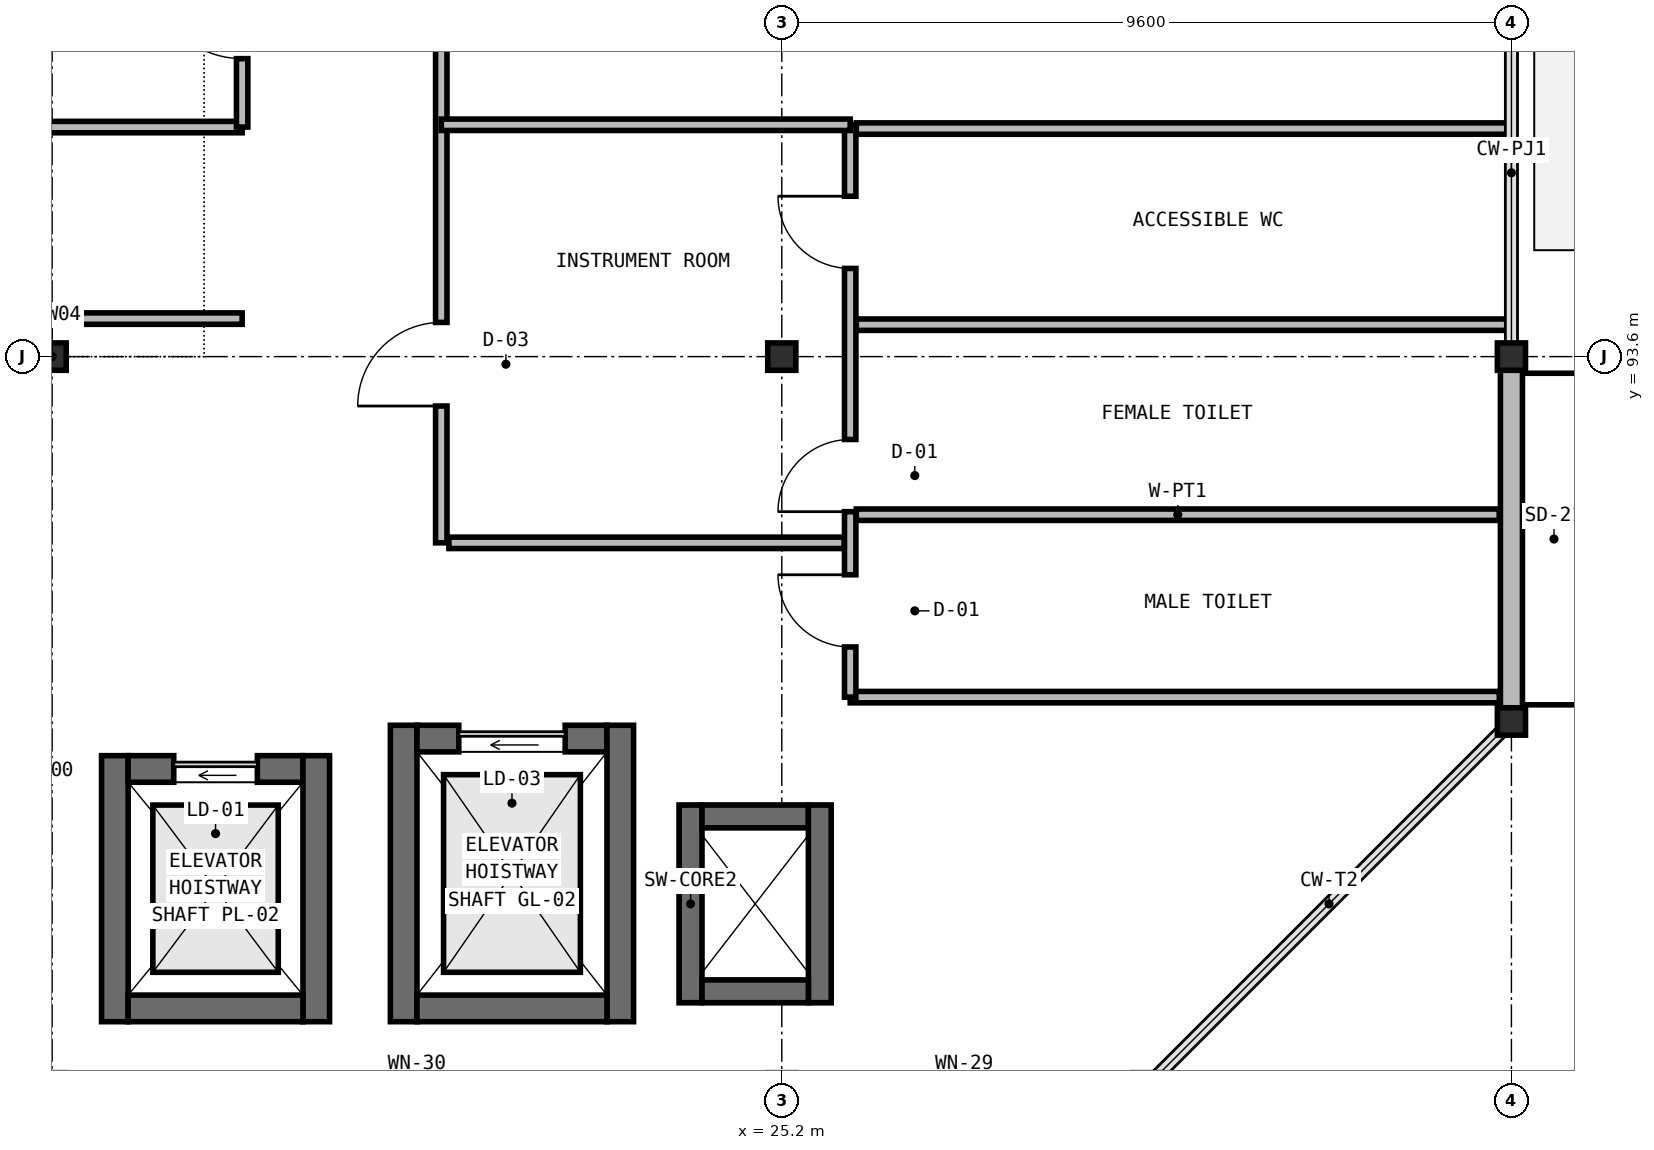
"""IFC4 building model, lengths in metres.
Left out: names, types, materials, properties, quantities, classifications, styles, units other than length and angle.
Written with IfcOpenShell. Run it as: python <this file> out.ifc"""

import sys

from ifc_helpers import new_model, si_unit, direction, frame, frame_2d, origin, origin_2d, place, context, subcontext, project, spatial, rectangle, i_section, extrude, element, fill, save


model = new_model("IFC4")
c1 = context("Model", 3, precision=1e-05, world=origin(), true_north=direction((0.0, 1.0)))
c2 = subcontext(c1, "Body", "Model", "MODEL_VIEW")
j1 = project(units=[si_unit("LENGTHUNIT", "METRE"), si_unit("PLANEANGLEUNIT", "RADIAN")], contexts=[c1])
p1 = place(None, origin())
s1 = spatial("IfcSite", under=j1, at=p1, CompositionType="ELEMENT")
p2 = place(p1, origin())
s2 = spatial("IfcBuilding", under=s1, at=p2, CompositionType="ELEMENT")
p3 = place(p2, frame((0.0, 0.0, 9.8)))
s3 = spatial("IfcBuildingStorey", under=s2, at=p3, CompositionType="ELEMENT", Elevation=9.8)
p4 = place(p3, frame((16.425, 84.85, 0.0), z_axis=(0.0, 0.0, 1.0), x_axis=(0.0, 1.0, 0.0)))
e1 = element("IfcWall", 1, at=p4, inside=s3, PredefinedType="SHEAR", context=c2, shape_type="SweptSolid", body=[
    extrude(rectangle(XDim=3.5, YDim=0.35, at=frame_2d((1.75, 0.0))), origin(), (0.0, 0.0, 1.0), 4.55),
])
p5 = place(p3, frame((16.6, 88.175, 0.0), z_axis=(0.0, 0.0, 1.0), x_axis=(1.0, 0.0, 0.0)))
e2 = element("IfcWall", 2, at=p5, inside=s3, PredefinedType="SHEAR", context=c2, shape_type="SweptSolid", body=[
    extrude(rectangle(XDim=2.3, YDim=0.35, at=frame_2d((1.15, 0.0))), origin(), (0.0, 0.0, 1.0), 4.55),
])
p6 = place(p5, frame((0.6, 0.0, 0.0)))
e3 = element("IfcOpeningElement", 3, at=p6, cuts=e2, PredefinedType="OPENING", context=c2, shape_type="SweptSolid", body=[
    extrude(rectangle(XDim=1.1, YDim=2.15, at=frame_2d((0.55, 1.075))), frame((0.0, 0.185, 0.0), z_axis=(0.0, -1.0, 0.0), x_axis=(1.0, 0.0, 0.0)), (0.0, 0.0, 1.0), 0.37),
])
p7 = place(p3, frame((19.075, 88.35, 0.0), z_axis=(0.0, 0.0, 1.0), x_axis=(0.0, -1.0, 0.0)))
e4 = element("IfcWall", 4, at=p7, inside=s3, PredefinedType="SHEAR", context=c2, shape_type="SweptSolid", body=[
    extrude(rectangle(XDim=3.5, YDim=0.35, at=frame_2d((1.75, 0.0))), origin(), (0.0, 0.0, 1.0), 4.55),
])
p8 = place(p3, frame((18.9, 85.025, 0.0), z_axis=(0.0, 0.0, 1.0), x_axis=(-1.0, 0.0, 0.0)))
e5 = element("IfcWall", 5, at=p8, inside=s3, PredefinedType="SHEAR", context=c2, shape_type="SweptSolid", body=[
    extrude(rectangle(XDim=2.3, YDim=0.35, at=frame_2d((1.15, 0.0))), origin(), (0.0, 0.0, 1.0), 4.55),
])
p9 = place(p3, frame((20.225, 84.85, 0.0), z_axis=(0.0, 0.0, 1.0), x_axis=(0.0, 1.0, 0.0)))
e6 = element("IfcWall", 6, at=p9, inside=s3, PredefinedType="SHEAR", context=c2, shape_type="SweptSolid", body=[
    extrude(rectangle(XDim=3.9, YDim=0.35, at=frame_2d((1.95, 0.0))), origin(), (0.0, 0.0, 1.0), 4.55),
])
p10 = place(p3, frame((20.4, 88.575, 0.0), z_axis=(0.0, 0.0, 1.0), x_axis=(1.0, 0.0, 0.0)))
e7 = element("IfcWall", 7, at=p10, inside=s3, PredefinedType="SHEAR", context=c2, shape_type="SweptSolid", body=[
    extrude(rectangle(XDim=2.5, YDim=0.35, at=frame_2d((1.25, 0.0))), origin(), (0.0, 0.0, 1.0), 4.55),
])
p11 = place(p10, frame((0.55, 0.0, 0.0)))
e8 = element("IfcOpeningElement", 8, at=p11, cuts=e7, PredefinedType="OPENING", context=c2, shape_type="SweptSolid", body=[
    extrude(rectangle(XDim=1.4, YDim=2.3, at=frame_2d((0.7, 1.15))), frame((0.0, 0.185, 0.0), z_axis=(0.0, -1.0, 0.0), x_axis=(1.0, 0.0, 0.0)), (0.0, 0.0, 1.0), 0.37),
])
p12 = place(p3, frame((23.075, 88.75, 0.0), z_axis=(0.0, 0.0, 1.0), x_axis=(0.0, -1.0, 0.0)))
e9 = element("IfcWall", 9, at=p12, inside=s3, PredefinedType="SHEAR", context=c2, shape_type="SweptSolid", body=[
    extrude(rectangle(XDim=3.9, YDim=0.35, at=frame_2d((1.95, 0.0))), origin(), (0.0, 0.0, 1.0), 4.55),
])
p13 = place(p3, frame((22.9, 85.025, 0.0), z_axis=(0.0, 0.0, 1.0), x_axis=(-1.0, 0.0, 0.0)))
e10 = element("IfcWall", 10, at=p13, inside=s3, PredefinedType="SHEAR", context=c2, shape_type="SweptSolid", body=[
    extrude(rectangle(XDim=2.5, YDim=0.35, at=frame_2d((1.25, 0.0))), origin(), (0.0, 0.0, 1.0), 4.55),
])
for number, where, z_axis, x_axis in (
    (11, (15.6, 93.6, 0.0), (0.0, 0.0, 1.0), (1.0, 0.0, 0.0)),
    (12, (25.2, 93.6, 0.0), (0.0, 0.0, 1.0), (1.0, 0.0, 0.0)),
    (13, (34.8, 93.6, 0.0), (0.0, 0.0, 1.0), (1.0, 0.0, 0.0)),
    (14, (34.8, 88.8, 0.0), (0.0, 0.0, 1.0), (1.0, 0.0, 0.0)),
):
    element("IfcColumn", number, at=place(p3, frame(where, z_axis=z_axis, x_axis=x_axis)), inside=s3, PredefinedType="COLUMN", context=c2, shape_type="SweptSolid", body=[
        extrude(i_section(OverallWidth=0.37, OverallDepth=0.36, WebThickness=0.014, FlangeThickness=0.022, at=origin_2d()), origin(), (0.0, 0.0, 1.0), 4.55),
    ])
p14 = place(p3, frame((24.0, 85.1, 0.0), z_axis=(0.0, 0.0, 1.0), x_axis=(0.0, 1.0, 0.0)))
e15 = element("IfcWall", 15, at=p14, inside=s3, PredefinedType="SHEAR", context=c2, shape_type="SweptSolid", body=[
    extrude(rectangle(XDim=2.6, YDim=0.3, at=frame_2d((1.3, 0.0))), origin(), (0.0, 0.0, 1.0), 4.37),
])
p15 = place(p3, frame((24.15, 87.55, 0.0), z_axis=(0.0, 0.0, 1.0), x_axis=(1.0, 0.0, 0.0)))
e16 = element("IfcWall", 16, at=p15, inside=s3, PredefinedType="SHEAR", context=c2, shape_type="SweptSolid", body=[
    extrude(rectangle(XDim=1.4, YDim=0.3, at=frame_2d((0.7, 0.0))), origin(), (0.0, 0.0, 1.0), 4.37),
])
p16 = place(p3, frame((25.7, 87.7, 0.0), z_axis=(0.0, 0.0, 1.0), x_axis=(0.0, -1.0, 0.0)))
e17 = element("IfcWall", 17, at=p16, inside=s3, PredefinedType="SHEAR", context=c2, shape_type="SweptSolid", body=[
    extrude(rectangle(XDim=2.6, YDim=0.3, at=frame_2d((1.3, 0.0))), origin(), (0.0, 0.0, 1.0), 4.37),
])
p17 = place(p3, frame((25.55, 85.25, 0.0), z_axis=(0.0, 0.0, 1.0), x_axis=(-1.0, 0.0, 0.0)))
e18 = element("IfcWall", 18, at=p17, inside=s3, PredefinedType="SHEAR", context=c2, shape_type="SweptSolid", body=[
    extrude(rectangle(XDim=1.4, YDim=0.3, at=frame_2d((0.7, 0.0))), origin(), (0.0, 0.0, 1.0), 4.37),
])
p18 = place(p3, frame((34.8, 93.596, 0.0), z_axis=(0.0, 0.0, 1.0), x_axis=(0.0, -1.0, 0.0)))
e19 = element("IfcWall", 19, at=p18, inside=s3, PredefinedType="SOLIDWALL", context=c2, shape_type="SweptSolid", body=[
    extrude(rectangle(XDim=4.792, YDim=0.29, at=frame_2d((2.396, 0.0))), origin(), (0.0, 0.0, 1.0), 4.37),
])
p19 = place(p3, frame((26.18, 91.52, 0.0), z_axis=(0.0, 0.0, 1.0), x_axis=(1.0, 0.0, 0.0)))
e20 = element("IfcWall", 20, at=p19, inside=s3, PredefinedType="PARTITIONING", context=c2, shape_type="SweptSolid", body=[
    extrude(rectangle(XDim=8.46, YDim=0.15, at=frame_2d((4.23, 0.0))), origin(), (0.0, 0.0, 1.0), 4.3),
])
for number, where, z_axis, x_axis in (
    (21, (26.18, 94.02, 0.0), (0.0, 0.0, 1.0), (1.0, 0.0, 0.0)),
    (22, (26.18, 96.6, 0.0), (0.0, 0.0, 1.0), (1.0, 0.0, 0.0)),
):
    element("IfcWall", number, at=place(p3, frame(where, z_axis=z_axis, x_axis=x_axis)), inside=s3, PredefinedType="PARTITIONING", context=c2, shape_type="SweptSolid", body=[
        extrude(rectangle(XDim=8.56, YDim=0.15, at=frame_2d((4.28, 0.0))), origin(), (0.0, 0.0, 1.0), 4.3),
    ])
p20 = place(p3, frame((26.1, 89.12, 0.0), z_axis=(0.0, 0.0, 1.0), x_axis=(1.0, 0.0, 0.0)))
e23 = element("IfcWall", 23, at=p20, inside=s3, PredefinedType="PARTITIONING", context=c2, shape_type="SweptSolid", body=[
    extrude(rectangle(XDim=8.54, YDim=0.15, at=frame_2d((4.27, 0.0))), origin(), (0.0, 0.0, 1.0), 4.3),
])
p21 = place(p3, frame((26.1, 89.12, 0.0), z_axis=(0.0, 0.0, 1.0), x_axis=(0.0, 1.0, 0.0)))
e24 = element("IfcWall", 24, at=p21, inside=s3, PredefinedType="PARTITIONING", context=c2, shape_type="SweptSolid", body=[
    extrude(rectangle(XDim=7.53, YDim=0.15, at=frame_2d((3.765, 0.0))), origin(), (0.0, 0.0, 1.0), 4.3),
])
p22 = place(p21, frame((0.66, 0.0, 0.0)))
e25 = element("IfcOpeningElement", 25, at=p22, cuts=e24, PredefinedType="OPENING", context=c2, shape_type="SweptSolid", body=[
    extrude(rectangle(XDim=0.95, YDim=2.1, at=frame_2d((0.475, 1.05))), frame((0.0, 0.085, 0.0), z_axis=(0.0, -1.0, 0.0), x_axis=(1.0, 0.0, 0.0)), (0.0, 0.0, 1.0), 0.17),
])
p23 = place(p21, frame((2.44, 0.0, 0.0)))
e26 = element("IfcOpeningElement", 26, at=p23, cuts=e24, PredefinedType="OPENING", context=c2, shape_type="SweptSolid", body=[
    extrude(rectangle(XDim=0.95, YDim=2.1, at=frame_2d((0.475, 1.05))), frame((0.0, 0.085, 0.0), z_axis=(0.0, -1.0, 0.0), x_axis=(1.0, 0.0, 0.0)), (0.0, 0.0, 1.0), 0.17),
])
p24 = place(p21, frame((5.64, 0.0, 0.0)))
e27 = element("IfcOpeningElement", 27, at=p24, cuts=e24, PredefinedType="OPENING", context=c2, shape_type="SweptSolid", body=[
    extrude(rectangle(XDim=0.95, YDim=2.1, at=frame_2d((0.475, 1.05))), frame((0.0, 0.085, 0.0), z_axis=(0.0, -1.0, 0.0), x_axis=(1.0, 0.0, 0.0)), (0.0, 0.0, 1.0), 0.17),
])
p25 = place(p3, frame((6.16, 96.62, 0.0), z_axis=(0.0, 0.0, 1.0), x_axis=(1.0, 0.0, 0.0)))
e28 = element("IfcWall", 28, at=p25, inside=s3, PredefinedType="PARTITIONING", context=c2, shape_type="SweptSolid", body=[
    extrude(rectangle(XDim=11.94, YDim=0.15, at=frame_2d((5.97, 0.0))), origin(), (0.0, 0.0, 1.0), 4.3),
])
p26 = place(p3, frame((11.02, 94.1, 0.0), z_axis=(0.0, 0.0, 1.0), x_axis=(1.0, 0.0, 0.0)))
e29 = element("IfcWall", 29, at=p26, inside=s3, PredefinedType="PARTITIONING", context=c2, shape_type="SweptSolid", body=[
    extrude(rectangle(XDim=7.08, YDim=0.15, at=frame_2d((3.54, 0.0))), origin(), (0.0, 0.0, 1.0), 4.3),
])
p27 = place(p3, frame((18.1, 96.62, 0.0), z_axis=(0.0, 0.0, 1.0), x_axis=(0.0, 1.0, 0.0)))
e30 = element("IfcWall", 30, at=p27, inside=s3, PredefinedType="PARTITIONING", context=c2, shape_type="SweptSolid", body=[
    extrude(rectangle(XDim=20.82, YDim=0.15, at=frame_2d((10.41, 0.0))), origin(), (0.0, 0.0, 1.0), 4.3),
])
p28 = place(p27, frame((0.9, 0.0, 0.0)))
e31 = element("IfcOpeningElement", 31, at=p28, cuts=e30, PredefinedType="OPENING", context=c2, shape_type="SweptSolid", body=[
    extrude(rectangle(XDim=1.2, YDim=2.2, at=frame_2d((0.6, 1.1))), frame((0.0, 0.085, 0.0), z_axis=(0.0, -1.0, 0.0), x_axis=(1.0, 0.0, 0.0)), (0.0, 0.0, 1.0), 0.17),
])
p29 = place(p27, frame((4.2, 0.0, 0.0)))
e32 = element("IfcOpeningElement", 32, at=p29, cuts=e30, PredefinedType="OPENING", context=c2, shape_type="SweptSolid", body=[
    extrude(rectangle(XDim=1.2, YDim=2.2, at=frame_2d((0.6, 1.1))), frame((0.0, 0.085, 0.0), z_axis=(0.0, -1.0, 0.0), x_axis=(1.0, 0.0, 0.0)), (0.0, 0.0, 1.0), 0.17),
])
p30 = place(p27, frame((9.4, 0.0, 0.0)))
e33 = element("IfcOpeningElement", 33, at=p30, cuts=e30, PredefinedType="OPENING", context=c2, shape_type="SweptSolid", body=[
    extrude(rectangle(XDim=1.0, YDim=2.2, at=frame_2d((0.5, 1.1))), frame((0.0, 0.085, 0.0), z_axis=(0.0, -1.0, 0.0), x_axis=(1.0, 0.0, 0.0)), (0.0, 0.0, 1.0), 0.17),
])
p31 = place(p3, frame((20.72, 91.15, 0.0), z_axis=(0.0, 0.0, 1.0), x_axis=(0.0, 1.0, 0.0)))
e34 = element("IfcWall", 34, at=p31, inside=s3, PredefinedType="PARTITIONING", context=c2, shape_type="SweptSolid", body=[
    extrude(rectangle(XDim=12.8, YDim=0.15, at=frame_2d((6.4, 0.0))), origin(), (0.0, 0.0, 1.0), 4.3),
])
p32 = place(p31, frame((1.8, 0.0, 0.0)))
e35 = element("IfcOpeningElement", 35, at=p32, cuts=e34, PredefinedType="OPENING", context=c2, shape_type="SweptSolid", body=[
    extrude(rectangle(XDim=1.1, YDim=2.2, at=frame_2d((0.55, 1.1))), frame((0.0, 0.085, 0.0), z_axis=(0.0, -1.0, 0.0), x_axis=(1.0, 0.0, 0.0)), (0.0, 0.0, 1.0), 0.17),
])
p33 = place(p31, frame((6.8, 0.0, 0.0)))
e36 = element("IfcOpeningElement", 36, at=p33, cuts=e34, PredefinedType="OPENING", context=c2, shape_type="SweptSolid", body=[
    extrude(rectangle(XDim=1.2, YDim=2.2, at=frame_2d((0.6, 1.1))), frame((0.0, 0.085, 0.0), z_axis=(0.0, -1.0, 0.0), x_axis=(1.0, 0.0, 0.0)), (0.0, 0.0, 1.0), 0.17),
])
p34 = place(p3, frame((20.82, 91.15, 0.0), z_axis=(0.0, 0.0, 1.0), x_axis=(1.0, 0.0, 0.0)))
e37 = element("IfcWall", 37, at=p34, inside=s3, PredefinedType="PARTITIONING", context=c2, shape_type="SweptSolid", body=[
    extrude(rectangle(XDim=5.2, YDim=0.15, at=frame_2d((2.6, 0.0))), origin(), (0.0, 0.0, 1.0), 4.3),
])
p35 = place(p3, frame((20.72, 96.65, 0.0), z_axis=(0.0, 0.0, 1.0), x_axis=(1.0, 0.0, 0.0)))
e38 = element("IfcWall", 38, at=p35, inside=s3, PredefinedType="PARTITIONING", context=c2, shape_type="SweptSolid", body=[
    extrude(rectangle(XDim=5.38, YDim=0.15, at=frame_2d((2.69, 0.0))), origin(), (0.0, 0.0, 1.0), 4.3),
])
p36 = place(p6, origin())
e39 = element("IfcDoor", 39, at=p36, inside=s3, OperationType="SLIDING_TO_LEFT", PredefinedType="USERDEFINED", context=c2, shape_type="SweptSolid", body=[
    extrude(rectangle(XDim=1.1, YDim=2.15, at=frame_2d((0.55, 1.075))), frame((0.0, 0.025, 0.0), z_axis=(0.0, -1.0, 0.0), x_axis=(1.0, 0.0, 0.0)), (0.0, 0.0, 1.0), 0.05),
])
fill(e3, e39)
p37 = place(p11, origin())
e40 = element("IfcDoor", 40, at=p37, inside=s3, OperationType="SLIDING_TO_LEFT", PredefinedType="USERDEFINED", context=c2, shape_type="SweptSolid", body=[
    extrude(rectangle(XDim=1.4, YDim=2.3, at=frame_2d((0.7, 1.15))), frame((0.0, 0.025, 0.0), z_axis=(0.0, -1.0, 0.0), x_axis=(1.0, 0.0, 0.0)), (0.0, 0.0, 1.0), 0.05),
])
fill(e8, e40)
p38 = place(p22, origin())
e41 = element("IfcDoor", 41, at=p38, inside=s3, OperationType="SINGLE_SWING_RIGHT", PredefinedType="DOOR", context=c2, shape_type="SweptSolid", body=[
    extrude(rectangle(XDim=0.95, YDim=2.1, at=frame_2d((0.475, 1.05))), frame((0.0, 0.025, 0.0), z_axis=(0.0, -1.0, 0.0), x_axis=(1.0, 0.0, 0.0)), (0.0, 0.0, 1.0), 0.05),
])
fill(e25, e41)
p39 = place(p23, origin())
e42 = element("IfcDoor", 42, at=p39, inside=s3, OperationType="SINGLE_SWING_LEFT", PredefinedType="DOOR", context=c2, shape_type="SweptSolid", body=[
    extrude(rectangle(XDim=0.95, YDim=2.1, at=frame_2d((0.475, 1.05))), frame((0.0, 0.025, 0.0), z_axis=(0.0, -1.0, 0.0), x_axis=(1.0, 0.0, 0.0)), (0.0, 0.0, 1.0), 0.05),
])
fill(e26, e42)
p40 = place(p24, origin())
e43 = element("IfcDoor", 43, at=p40, inside=s3, OperationType="SINGLE_SWING_RIGHT", PredefinedType="DOOR", context=c2, shape_type="SweptSolid", body=[
    extrude(rectangle(XDim=0.95, YDim=2.1, at=frame_2d((0.475, 1.05))), frame((0.0, 0.025, 0.0), z_axis=(0.0, -1.0, 0.0), x_axis=(1.0, 0.0, 0.0)), (0.0, 0.0, 1.0), 0.05),
])
fill(e27, e43)
p41 = place(p28, origin())
e44 = element("IfcDoor", 44, at=p41, inside=s3, OperationType="SINGLE_SWING_RIGHT", PredefinedType="DOOR", context=c2, shape_type="SweptSolid", body=[
    extrude(rectangle(XDim=1.2, YDim=2.2, at=frame_2d((0.6, 1.1))), frame((0.0, 0.025, 0.0), z_axis=(0.0, -1.0, 0.0), x_axis=(1.0, 0.0, 0.0)), (0.0, 0.0, 1.0), 0.05),
])
fill(e31, e44)
p42 = place(p32, origin())
e45 = element("IfcDoor", 45, at=p42, inside=s3, OperationType="SINGLE_SWING_LEFT", PredefinedType="DOOR", context=c2, shape_type="SweptSolid", body=[
    extrude(rectangle(XDim=1.1, YDim=2.2, at=frame_2d((0.55, 1.1))), frame((0.0, 0.025, 0.0), z_axis=(0.0, -1.0, 0.0), x_axis=(1.0, 0.0, 0.0)), (0.0, 0.0, 1.0), 0.05),
])
fill(e35, e45)
save(model, sys.argv[1])
